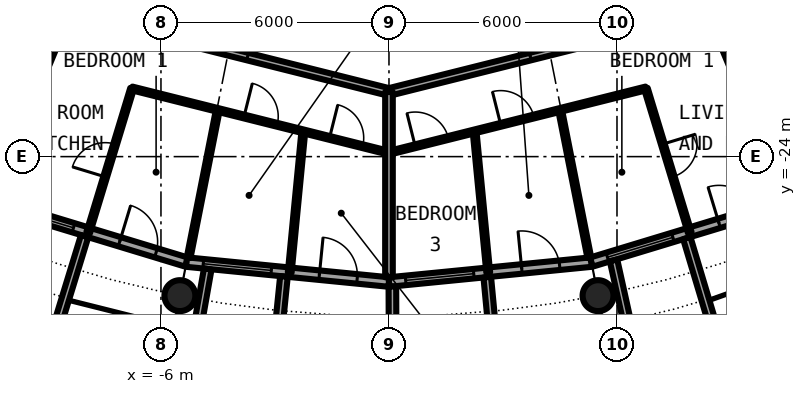
"""IFC4 building model, lengths in metres.
Left out: names, types, materials, properties, quantities, classifications, styles, units other than length and angle.
Written with IfcOpenShell. Run it as: python <this file> out.ifc"""

import sys

from ifc_helpers import new_model, si_unit, direction, frame, frame_2d, origin, origin_2d, place, context, subcontext, project, spatial, rectangle, circle, hollow_circle, extrude, element, fill, save


model = new_model("IFC4")
c1 = context("Model", 3, precision=1e-05, world=origin(), true_north=direction((0.0, 1.0)))
c2 = subcontext(c1, "Body", "Model", "MODEL_VIEW")
j1 = project(units=[si_unit("LENGTHUNIT", "METRE"), si_unit("PLANEANGLEUNIT", "RADIAN")], contexts=[c1])
p1 = place(None, origin())
s1 = spatial("IfcSite", under=j1, at=p1, CompositionType="ELEMENT")
p2 = place(p1, origin())
s2 = spatial("IfcBuilding", under=s1, at=p2, CompositionType="ELEMENT")
p3 = place(p2, frame((0.0, 0.0, 161.6)))
s3 = spatial("IfcBuildingStorey", under=s2, at=p3, CompositionType="ELEMENT", Elevation=161.6)
for number, where, z_axis, x_axis in (
    (1, (-5.501, -27.658, 0.0), (0.0, 0.0, 1.0), (1.0, 0.0, 0.0)),
    (2, (5.501, -27.658, 0.0), (0.0, 0.0, 1.0), (1.0, 0.0, 0.0)),
):
    element("IfcColumn", number, at=place(p3, frame(where, z_axis=z_axis, x_axis=x_axis)), inside=s3, PredefinedType="COLUMN", context=c2, shape_type="SweptSolid", body=[
        extrude(hollow_circle(Radius=0.406, WallThickness=0.04, at=origin_2d()), origin(), (0.0, 0.0, 1.0), 3.05),
    ])
p4 = place(p3, frame((-10.447, -25.222, 0.0), z_axis=(0.0, 0.0, 1.0), x_axis=(0.956965678721, -0.290201119486, 0.0)))
e3 = element("IfcWall", 3, at=p4, inside=s3, PredefinedType="SOLIDWALL", context=c2, shape_type="SweptSolid", body=[
    extrude(rectangle(XDim=5.351, YDim=0.25, at=frame_2d((2.676, 0.0))), origin(), (0.0, 0.0, 1.0), 2.7),
])
p5 = place(p4, frame((0.441, 0.0, 0.3)))
e4 = element("IfcOpeningElement", 4, at=p5, cuts=e3, PredefinedType="OPENING", context=c2, shape_type="SweptSolid", body=[
    extrude(rectangle(XDim=1.8, YDim=2.1, at=frame_2d((0.9, 1.05))), frame((0.0, 0.135, 0.0), z_axis=(0.0, -1.0, 0.0), x_axis=(1.0, 0.0, 0.0)), (0.0, 0.0, 1.0), 0.27),
])
p6 = place(p4, frame((3.51, 0.0, 0.0)))
e5 = element("IfcOpeningElement", 5, at=p6, cuts=e3, PredefinedType="OPENING", context=c2, shape_type="SweptSolid", body=[
    extrude(rectangle(XDim=1.0, YDim=2.2, at=frame_2d((0.5, 1.1))), frame((0.0, 0.135, 0.0), z_axis=(0.0, -1.0, 0.0), x_axis=(1.0, 0.0, 0.0)), (0.0, 0.0, 1.0), 0.27),
])
p7 = place(p3, frame((-11.638, -28.084, -0.03), z_axis=(0.0, 0.0, 1.0), x_axis=(0.941461077774, -0.337121697664, 0.0)))
e6 = element("IfcWall", 6, at=p7, inside=s3, PredefinedType="SOLIDWALL", context=c2, shape_type="SweptSolid", body=[
    extrude(rectangle(XDim=2.993, YDim=0.2, at=frame_2d((1.497, 0.0))), origin(), (0.0, 0.0, 1.0), 2.73),
])
p8 = place(p7, frame((0.457, 0.0, 0.33)))
e7 = element("IfcOpeningElement", 7, at=p8, cuts=e6, PredefinedType="OPENING", context=c2, shape_type="SweptSolid", body=[
    extrude(circle(Radius=1.04, at=frame_2d((1.04, 1.04))), frame((0.0, 0.11, 0.0), z_axis=(0.0, -1.0, 0.0), x_axis=(1.0, 0.0, 0.0)), (0.0, 0.0, 1.0), 0.22),
])
p9 = place(p3, frame((-8.009, -26.092, -0.03), z_axis=(0.0, 0.0, 1.0), x_axis=(-0.293406695073, -0.955987715029, 0.0)))
e8 = element("IfcWall", 8, at=p9, inside=s3, PredefinedType="SOLIDWALL", context=c2, shape_type="SweptSolid", body=[
    extrude(rectangle(XDim=3.006, YDim=0.2, at=frame_2d((1.503, 0.0))), origin(), (0.0, 0.0, 1.0), 2.73),
])
p10 = place(p3, frame((-5.326, -26.775, 0.0), z_axis=(0.0, 0.0, 1.0), x_axis=(0.995173996315, -0.098126026407, 0.0)))
e9 = element("IfcWall", 9, at=p10, inside=s3, PredefinedType="SOLIDWALL", context=c2, shape_type="SweptSolid", body=[
    extrude(rectangle(XDim=5.352, YDim=0.25, at=frame_2d((2.676, 0.0))), origin(), (0.0, 0.0, 1.0), 2.7),
])
p11 = place(p10, frame((0.441, 0.0, 0.3)))
e10 = element("IfcOpeningElement", 10, at=p11, cuts=e9, PredefinedType="OPENING", context=c2, shape_type="SweptSolid", body=[
    extrude(rectangle(XDim=1.8, YDim=2.1, at=frame_2d((0.9, 1.05))), frame((0.0, 0.135, 0.0), z_axis=(0.0, -1.0, 0.0), x_axis=(1.0, 0.0, 0.0)), (0.0, 0.0, 1.0), 0.27),
])
p12 = place(p10, frame((3.51, 0.0, 0.0)))
e11 = element("IfcOpeningElement", 11, at=p12, cuts=e9, PredefinedType="OPENING", context=c2, shape_type="SweptSolid", body=[
    extrude(rectangle(XDim=1.0, YDim=2.2, at=frame_2d((0.5, 1.1))), frame((0.0, 0.135, 0.0), z_axis=(0.0, -1.0, 0.0), x_axis=(1.0, 0.0, 0.0)), (0.0, 0.0, 1.0), 0.27),
])
p13 = place(p3, frame((-4.769, -26.956, -0.03), z_axis=(0.0, 0.0, 1.0), x_axis=(-0.174056778901, -0.984735618183, 0.0)))
e12 = element("IfcWall", 12, at=p13, inside=s3, PredefinedType="SOLIDWALL", context=c2, shape_type="SweptSolid", body=[
    extrude(rectangle(XDim=2.925, YDim=0.2, at=frame_2d((1.462, 0.0))), origin(), (0.0, 0.0, 1.0), 2.73),
])
p14 = place(p3, frame((-2.764, -27.153, -0.03), z_axis=(0.0, 0.0, 1.0), x_axis=(-0.101505487237, -0.994834979311, 0.0)))
e13 = element("IfcWall", 13, at=p14, inside=s3, PredefinedType="SOLIDWALL", context=c2, shape_type="SweptSolid", body=[
    extrude(rectangle(XDim=3.007, YDim=0.2, at=frame_2d((1.503, 0.0))), origin(), (0.0, 0.0, 1.0), 2.73),
])
p15 = place(p3, frame((0.0, -27.3, 0.0), z_axis=(0.0, 0.0, 1.0), x_axis=(0.995173996315, 0.098126026407, 0.0)))
e14 = element("IfcWall", 14, at=p15, inside=s3, PredefinedType="SOLIDWALL", context=c2, shape_type="SweptSolid", body=[
    extrude(rectangle(XDim=5.352, YDim=0.25, at=frame_2d((2.676, 0.0))), origin(), (0.0, 0.0, 1.0), 2.7),
])
p16 = place(p15, frame((0.441, 0.0, 0.3)))
e15 = element("IfcOpeningElement", 15, at=p16, cuts=e14, PredefinedType="OPENING", context=c2, shape_type="SweptSolid", body=[
    extrude(rectangle(XDim=1.8, YDim=2.1, at=frame_2d((0.9, 1.05))), frame((0.0, 0.135, 0.0), z_axis=(0.0, -1.0, 0.0), x_axis=(1.0, 0.0, 0.0)), (0.0, 0.0, 1.0), 0.27),
])
p17 = place(p15, frame((3.51, 0.0, 0.0)))
e16 = element("IfcOpeningElement", 16, at=p17, cuts=e14, PredefinedType="OPENING", context=c2, shape_type="SweptSolid", body=[
    extrude(rectangle(XDim=1.0, YDim=2.2, at=frame_2d((0.5, 1.1))), frame((0.0, 0.135, 0.0), z_axis=(0.0, -1.0, 0.0), x_axis=(1.0, 0.0, 0.0)), (0.0, 0.0, 1.0), 0.27),
])
p18 = place(p3, frame((0.09, -27.417, -0.03), z_axis=(0.0, 0.0, 1.0), x_axis=(0.00347308367, -0.999993968827, 0.0)))
e17 = element("IfcWall", 17, at=p18, inside=s3, PredefinedType="SOLIDWALL", context=c2, shape_type="SweptSolid", body=[
    extrude(rectangle(XDim=2.882, YDim=0.2, at=frame_2d((1.441, 0.0))), origin(), (0.0, 0.0, 1.0), 2.73),
])
p19 = place(p3, frame((2.586, -27.171, -0.03), z_axis=(0.0, 0.0, 1.0), x_axis=(0.094548432284, -0.995520262954, 0.0)))
e18 = element("IfcWall", 18, at=p19, inside=s3, PredefinedType="SOLIDWALL", context=c2, shape_type="SweptSolid", body=[
    extrude(rectangle(XDim=3.006, YDim=0.2, at=frame_2d((1.503, 0.0))), origin(), (0.0, 0.0, 1.0), 2.73),
])
p20 = place(p3, frame((5.326, -26.775, 0.0), z_axis=(0.0, 0.0, 1.0), x_axis=(0.956965678721, 0.290201119486, 0.0)))
e19 = element("IfcWall", 19, at=p20, inside=s3, PredefinedType="SOLIDWALL", context=c2, shape_type="SweptSolid", body=[
    extrude(rectangle(XDim=5.351, YDim=0.25, at=frame_2d((2.676, 0.0))), origin(), (0.0, 0.0, 1.0), 2.7),
])
p21 = place(p20, frame((0.441, 0.0, 0.3)))
e20 = element("IfcOpeningElement", 20, at=p21, cuts=e19, PredefinedType="OPENING", context=c2, shape_type="SweptSolid", body=[
    extrude(rectangle(XDim=1.8, YDim=2.1, at=frame_2d((0.9, 1.05))), frame((0.0, 0.135, 0.0), z_axis=(0.0, -1.0, 0.0), x_axis=(1.0, 0.0, 0.0)), (0.0, 0.0, 1.0), 0.27),
])
p22 = place(p20, frame((3.51, 0.0, 0.0)))
e21 = element("IfcOpeningElement", 21, at=p22, cuts=e19, PredefinedType="OPENING", context=c2, shape_type="SweptSolid", body=[
    extrude(rectangle(XDim=1.0, YDim=2.2, at=frame_2d((0.5, 1.1))), frame((0.0, 0.135, 0.0), z_axis=(0.0, -1.0, 0.0), x_axis=(1.0, 0.0, 0.0)), (0.0, 0.0, 1.0), 0.27),
])
p23 = place(p3, frame((5.909, -26.729, -0.03), z_axis=(0.0, 0.0, 1.0), x_axis=(0.216409053917, -0.976302781612, 0.0)))
e22 = element("IfcWall", 22, at=p23, inside=s3, PredefinedType="SOLIDWALL", context=c2, shape_type="SweptSolid", body=[
    extrude(rectangle(XDim=2.925, YDim=0.2, at=frame_2d((1.463, 0.0))), origin(), (0.0, 0.0, 1.0), 2.73),
])
p24 = place(p3, frame((7.837, -26.144, -0.03), z_axis=(0.0, 0.0, 1.0), x_axis=(0.287064767992, -0.957911174889, 0.0)))
e23 = element("IfcWall", 23, at=p24, inside=s3, PredefinedType="SOLIDWALL", context=c2, shape_type="SweptSolid", body=[
    extrude(rectangle(XDim=3.006, YDim=0.2, at=frame_2d((1.503, 0.0))), origin(), (0.0, 0.0, 1.0), 2.73),
])
p25 = place(p3, frame((-6.762, -22.206, 0.0), z_axis=(0.0, 0.0, 1.0), x_axis=(0.97002908491, -0.242988836015, 0.0)))
e24 = element("IfcWall", 24, at=p25, inside=s3, PredefinedType="PARTITIONING", context=c2, shape_type="SweptSolid", body=[
    extrude(rectangle(XDim=6.971, YDim=0.1, at=frame_2d((3.485, 0.0))), origin(), (0.0, 0.0, 1.0), 2.7),
])
p26 = place(p25, frame((3.039, 0.0, 0.0)))
e25 = element("IfcOpeningElement", 25, at=p26, cuts=e24, PredefinedType="OPENING", context=c2, shape_type="SweptSolid", body=[
    extrude(rectangle(XDim=0.9, YDim=2.3, at=frame_2d((0.45, 1.15))), frame((0.0, 0.06, 0.0), z_axis=(0.0, -1.0, 0.0), x_axis=(1.0, 0.0, 0.0)), (0.0, 0.0, 1.0), 0.12),
])
p27 = place(p25, frame((5.358, 0.0, 0.0)))
e26 = element("IfcOpeningElement", 26, at=p27, cuts=e24, PredefinedType="OPENING", context=c2, shape_type="SweptSolid", body=[
    extrude(rectangle(XDim=0.9, YDim=2.3, at=frame_2d((0.45, 1.15))), frame((0.0, 0.06, 0.0), z_axis=(0.0, -1.0, 0.0), x_axis=(1.0, 0.0, 0.0)), (0.0, 0.0, 1.0), 0.12),
])
p28 = place(p3, frame((0.0, -23.9, 0.0), z_axis=(0.0, 0.0, 1.0), x_axis=(0.97002908491, 0.242988836015, 0.0)))
e27 = element("IfcWall", 27, at=p28, inside=s3, PredefinedType="PARTITIONING", context=c2, shape_type="SweptSolid", body=[
    extrude(rectangle(XDim=6.971, YDim=0.1, at=frame_2d((3.485, 0.0))), origin(), (0.0, 0.0, 1.0), 2.7),
])
p29 = place(p28, frame((3.032, 0.0, 0.0)))
e28 = element("IfcOpeningElement", 28, at=p29, cuts=e27, PredefinedType="OPENING", context=c2, shape_type="SweptSolid", body=[
    extrude(rectangle(XDim=0.9, YDim=2.3, at=frame_2d((0.45, 1.15))), frame((0.0, 0.06, 0.0), z_axis=(0.0, -1.0, 0.0), x_axis=(1.0, 0.0, 0.0)), (0.0, 0.0, 1.0), 0.12),
])
p30 = place(p28, frame((0.712, 0.0, 0.0)))
e29 = element("IfcOpeningElement", 29, at=p30, cuts=e27, PredefinedType="OPENING", context=c2, shape_type="SweptSolid", body=[
    extrude(rectangle(XDim=0.9, YDim=2.3, at=frame_2d((0.45, 1.15))), frame((0.0, 0.06, 0.0), z_axis=(0.0, -1.0, 0.0), x_axis=(1.0, 0.0, 0.0)), (0.0, 0.0, 1.0), 0.12),
])
p31 = place(p3, frame((-10.518, -19.665, 0.0), z_axis=(0.0, 0.0, 1.0), x_axis=(0.970023181991, -0.243012399685, 0.0)))
e30 = element("IfcWall", 30, at=p31, inside=s3, PredefinedType="PARTITIONING", context=c2, shape_type="SweptSolid", body=[
    extrude(rectangle(XDim=10.843, YDim=0.2, at=frame_2d((5.421, 0.0))), origin(), (0.0, 0.0, 1.0), 2.7),
])
p32 = place(p31, frame((6.008, 0.0, 0.0)))
e31 = element("IfcOpeningElement", 31, at=p32, cuts=e30, PredefinedType="OPENING", context=c2, shape_type="SweptSolid", body=[
    extrude(rectangle(XDim=1.0, YDim=2.3, at=frame_2d((0.5, 1.15))), frame((0.0, 0.11, 0.0), z_axis=(0.0, -1.0, 0.0), x_axis=(1.0, 0.0, 0.0)), (0.0, 0.0, 1.0), 0.22),
])
p33 = place(p3, frame((0.0, -22.3, 0.0), z_axis=(0.0, 0.0, 1.0), x_axis=(0.970023181991, 0.243012399685, 0.0)))
e32 = element("IfcWall", 32, at=p33, inside=s3, PredefinedType="PARTITIONING", context=c2, shape_type="SweptSolid", body=[
    extrude(rectangle(XDim=10.843, YDim=0.2, at=frame_2d((5.421, 0.0))), origin(), (0.0, 0.0, 1.0), 2.7),
])
p34 = place(p33, frame((3.835, 0.0, 0.0)))
e33 = element("IfcOpeningElement", 33, at=p34, cuts=e32, PredefinedType="OPENING", context=c2, shape_type="SweptSolid", body=[
    extrude(rectangle(XDim=1.0, YDim=2.3, at=frame_2d((0.5, 1.15))), frame((0.0, 0.11, 0.0), z_axis=(0.0, -1.0, 0.0), x_axis=(1.0, 0.0, 0.0)), (0.0, 0.0, 1.0), 0.22),
])
p35 = place(p3, frame((-9.01, -21.643, 0.0), z_axis=(0.0, 0.0, 1.0), x_axis=(0.384228756538, 0.923237923099, 0.0)))
e34 = element("IfcWall", 34, at=p35, inside=s3, PredefinedType="PARTITIONING", context=c2, shape_type="SweptSolid", body=[
    extrude(rectangle(XDim=1.569, YDim=0.1, at=frame_2d((0.785, 0.0))), origin(), (0.0, 0.0, 1.0), 2.7),
])
p36 = place(p3, frame((-7.914, -25.997, 0.0), z_axis=(0.0, 0.0, 1.0), x_axis=(0.291291575636, 0.956634317785, 0.0)))
e35 = element("IfcWall", 35, at=p36, inside=s3, PredefinedType="PARTITIONING", context=c2, shape_type="SweptSolid", body=[
    extrude(rectangle(XDim=3.962, YDim=0.1, at=frame_2d((1.981, 0.0))), origin(), (0.0, 0.0, 1.0), 2.7),
])
p37 = place(p36, frame((1.531, 0.0, 0.0)))
e36 = element("IfcOpeningElement", 36, at=p37, cuts=e35, PredefinedType="OPENING", context=c2, shape_type="SweptSolid", body=[
    extrude(rectangle(XDim=0.9, YDim=2.3, at=frame_2d((0.45, 1.15))), frame((0.0, 0.06, 0.0), z_axis=(0.0, -1.0, 0.0), x_axis=(1.0, 0.0, 0.0)), (0.0, 0.0, 1.0), 0.12),
])
p38 = place(p3, frame((-5.272, -26.659, 0.0), z_axis=(0.0, 0.0, 1.0), x_axis=(0.194089507313, 0.980983824103, 0.0)))
e37 = element("IfcWall", 37, at=p38, inside=s3, PredefinedType="PARTITIONING", context=c2, shape_type="SweptSolid", body=[
    extrude(rectangle(XDim=3.962, YDim=0.1, at=frame_2d((1.981, 0.0))), origin(), (0.0, 0.0, 1.0), 2.7),
])
p39 = place(p3, frame((-2.612, -27.049, 0.0), z_axis=(0.0, 0.0, 1.0), x_axis=(0.09626981452, 0.995355274669, 0.0)))
e38 = element("IfcWall", 38, at=p39, inside=s3, PredefinedType="PARTITIONING", context=c2, shape_type="SweptSolid", body=[
    extrude(rectangle(XDim=3.73, YDim=0.1, at=frame_2d((1.865, 0.0))), origin(), (0.0, 0.0, 1.0), 2.7),
])
p40 = place(p3, frame((0.0, -27.175, 0.0), z_axis=(0.0, 0.0, 1.0), x_axis=(0.0, 1.0, 0.0)))
e39 = element("IfcWall", 39, at=p40, inside=s3, PredefinedType="PARTITIONING", context=c2, shape_type="SweptSolid", body=[
    extrude(rectangle(XDim=4.875, YDim=0.2, at=frame_2d((2.438, 0.0))), origin(), (0.0, 0.0, 1.0), 2.7),
])
p41 = place(p3, frame((2.253, -23.336, 0.0), z_axis=(0.0, 0.0, 1.0), x_axis=(0.09626981452, -0.995355274669, 0.0)))
e40 = element("IfcWall", 40, at=p41, inside=s3, PredefinedType="PARTITIONING", context=c2, shape_type="SweptSolid", body=[
    extrude(rectangle(XDim=3.73, YDim=0.1, at=frame_2d((1.865, 0.0))), origin(), (0.0, 0.0, 1.0), 2.7),
])
p42 = place(p3, frame((4.503, -22.772, 0.0), z_axis=(0.0, 0.0, 1.0), x_axis=(0.194089507313, -0.980983824103, 0.0)))
e41 = element("IfcWall", 41, at=p42, inside=s3, PredefinedType="PARTITIONING", context=c2, shape_type="SweptSolid", body=[
    extrude(rectangle(XDim=3.962, YDim=0.1, at=frame_2d((1.981, 0.0))), origin(), (0.0, 0.0, 1.0), 2.7),
])
p43 = place(p3, frame((6.76, -22.207, 0.0), z_axis=(0.0, 0.0, 1.0), x_axis=(0.291291575636, -0.956634317785, 0.0)))
e42 = element("IfcWall", 42, at=p43, inside=s3, PredefinedType="PARTITIONING", context=c2, shape_type="SweptSolid", body=[
    extrude(rectangle(XDim=3.962, YDim=0.1, at=frame_2d((1.981, 0.0))), origin(), (0.0, 0.0, 1.0), 2.7),
])
p44 = place(p43, frame((1.531, 0.0, 0.0)))
e43 = element("IfcOpeningElement", 43, at=p44, cuts=e42, PredefinedType="OPENING", context=c2, shape_type="SweptSolid", body=[
    extrude(rectangle(XDim=0.9, YDim=2.3, at=frame_2d((0.45, 1.15))), frame((0.0, 0.06, 0.0), z_axis=(0.0, -1.0, 0.0), x_axis=(1.0, 0.0, 0.0)), (0.0, 0.0, 1.0), 0.12),
])
p45 = place(p3, frame((8.41, -20.193, 0.0), z_axis=(0.0, 0.0, 1.0), x_axis=(0.384228756538, -0.923237923099, 0.0)))
e44 = element("IfcWall", 44, at=p45, inside=s3, PredefinedType="PARTITIONING", context=c2, shape_type="SweptSolid", body=[
    extrude(rectangle(XDim=1.569, YDim=0.1, at=frame_2d((0.785, 0.0))), origin(), (0.0, 0.0, 1.0), 2.7),
])
p46 = place(p5, origin())
e45 = element("IfcWindow", 45, at=p46, inside=s3, PartitioningType="SINGLE_PANEL", PredefinedType="WINDOW", context=c2, shape_type="SweptSolid", body=[
    extrude(rectangle(XDim=1.8, YDim=2.1, at=frame_2d((0.9, 1.05))), frame((0.0, 0.03, 0.0), z_axis=(0.0, -1.0, 0.0), x_axis=(1.0, 0.0, 0.0)), (0.0, 0.0, 1.0), 0.06),
])
fill(e4, e45)
p47 = place(p6, origin())
e46 = element("IfcDoor", 46, at=p47, inside=s3, OperationType="SINGLE_SWING_LEFT", PredefinedType="DOOR", context=c2, shape_type="SweptSolid", body=[
    extrude(rectangle(XDim=1.0, YDim=2.2, at=frame_2d((0.5, 1.1))), frame((0.0, 0.025, 0.0), z_axis=(0.0, -1.0, 0.0), x_axis=(1.0, 0.0, 0.0)), (0.0, 0.0, 1.0), 0.05),
])
fill(e5, e46)
p48 = place(p11, origin())
e47 = element("IfcWindow", 47, at=p48, inside=s3, PartitioningType="SINGLE_PANEL", PredefinedType="WINDOW", context=c2, shape_type="SweptSolid", body=[
    extrude(rectangle(XDim=1.8, YDim=2.1, at=frame_2d((0.9, 1.05))), frame((0.0, 0.03, 0.0), z_axis=(0.0, -1.0, 0.0), x_axis=(1.0, 0.0, 0.0)), (0.0, 0.0, 1.0), 0.06),
])
fill(e10, e47)
p49 = place(p12, origin())
e48 = element("IfcDoor", 48, at=p49, inside=s3, OperationType="SINGLE_SWING_LEFT", PredefinedType="DOOR", context=c2, shape_type="SweptSolid", body=[
    extrude(rectangle(XDim=1.0, YDim=2.2, at=frame_2d((0.5, 1.1))), frame((0.0, 0.025, 0.0), z_axis=(0.0, -1.0, 0.0), x_axis=(1.0, 0.0, 0.0)), (0.0, 0.0, 1.0), 0.05),
])
fill(e11, e48)
p50 = place(p16, origin())
e49 = element("IfcWindow", 49, at=p50, inside=s3, PartitioningType="SINGLE_PANEL", PredefinedType="WINDOW", context=c2, shape_type="SweptSolid", body=[
    extrude(rectangle(XDim=1.8, YDim=2.1, at=frame_2d((0.9, 1.05))), frame((0.0, 0.03, 0.0), z_axis=(0.0, -1.0, 0.0), x_axis=(1.0, 0.0, 0.0)), (0.0, 0.0, 1.0), 0.06),
])
fill(e15, e49)
p51 = place(p17, origin())
e50 = element("IfcDoor", 50, at=p51, inside=s3, OperationType="SINGLE_SWING_LEFT", PredefinedType="DOOR", context=c2, shape_type="SweptSolid", body=[
    extrude(rectangle(XDim=1.0, YDim=2.2, at=frame_2d((0.5, 1.1))), frame((0.0, 0.025, 0.0), z_axis=(0.0, -1.0, 0.0), x_axis=(1.0, 0.0, 0.0)), (0.0, 0.0, 1.0), 0.05),
])
fill(e16, e50)
p52 = place(p21, origin())
e51 = element("IfcWindow", 51, at=p52, inside=s3, PartitioningType="SINGLE_PANEL", PredefinedType="WINDOW", context=c2, shape_type="SweptSolid", body=[
    extrude(rectangle(XDim=1.8, YDim=2.1, at=frame_2d((0.9, 1.05))), frame((0.0, 0.03, 0.0), z_axis=(0.0, -1.0, 0.0), x_axis=(1.0, 0.0, 0.0)), (0.0, 0.0, 1.0), 0.06),
])
fill(e20, e51)
p53 = place(p22, origin())
e52 = element("IfcDoor", 52, at=p53, inside=s3, OperationType="SINGLE_SWING_LEFT", PredefinedType="DOOR", context=c2, shape_type="SweptSolid", body=[
    extrude(rectangle(XDim=1.0, YDim=2.2, at=frame_2d((0.5, 1.1))), frame((0.0, 0.025, 0.0), z_axis=(0.0, -1.0, 0.0), x_axis=(1.0, 0.0, 0.0)), (0.0, 0.0, 1.0), 0.05),
])
fill(e21, e52)
p54 = place(p32, origin())
e53 = element("IfcDoor", 53, at=p54, inside=s3, OperationType="SINGLE_SWING_RIGHT", PredefinedType="DOOR", context=c2, shape_type="SweptSolid", body=[
    extrude(rectangle(XDim=1.0, YDim=2.3, at=frame_2d((0.5, 1.15))), frame((0.0, 0.025, 0.0), z_axis=(0.0, -1.0, 0.0), x_axis=(1.0, 0.0, 0.0)), (0.0, 0.0, 1.0), 0.05),
])
fill(e31, e53)
p55 = place(p37, origin())
e54 = element("IfcDoor", 54, at=p55, inside=s3, OperationType="SINGLE_SWING_RIGHT", PredefinedType="DOOR", context=c2, shape_type="SweptSolid", body=[
    extrude(rectangle(XDim=0.9, YDim=2.3, at=frame_2d((0.45, 1.15))), frame((0.0, 0.025, 0.0), z_axis=(0.0, -1.0, 0.0), x_axis=(1.0, 0.0, 0.0)), (0.0, 0.0, 1.0), 0.05),
])
fill(e36, e54)
p56 = place(p26, origin())
e55 = element("IfcDoor", 55, at=p56, inside=s3, OperationType="SINGLE_SWING_RIGHT", PredefinedType="DOOR", context=c2, shape_type="SweptSolid", body=[
    extrude(rectangle(XDim=0.9, YDim=2.3, at=frame_2d((0.45, 1.15))), frame((0.0, 0.025, 0.0), z_axis=(0.0, -1.0, 0.0), x_axis=(1.0, 0.0, 0.0)), (0.0, 0.0, 1.0), 0.05),
])
fill(e25, e55)
p57 = place(p27, origin())
e56 = element("IfcDoor", 56, at=p57, inside=s3, OperationType="SINGLE_SWING_RIGHT", PredefinedType="DOOR", context=c2, shape_type="SweptSolid", body=[
    extrude(rectangle(XDim=0.9, YDim=2.3, at=frame_2d((0.45, 1.15))), frame((0.0, 0.025, 0.0), z_axis=(0.0, -1.0, 0.0), x_axis=(1.0, 0.0, 0.0)), (0.0, 0.0, 1.0), 0.05),
])
fill(e26, e56)
p58 = place(p34, origin())
e57 = element("IfcDoor", 57, at=p58, inside=s3, OperationType="SINGLE_SWING_LEFT", PredefinedType="DOOR", context=c2, shape_type="SweptSolid", body=[
    extrude(rectangle(XDim=1.0, YDim=2.3, at=frame_2d((0.5, 1.15))), frame((0.0, 0.025, 0.0), z_axis=(0.0, -1.0, 0.0), x_axis=(1.0, 0.0, 0.0)), (0.0, 0.0, 1.0), 0.05),
])
fill(e33, e57)
p59 = place(p44, origin())
e58 = element("IfcDoor", 58, at=p59, inside=s3, OperationType="SINGLE_SWING_RIGHT", PredefinedType="DOOR", context=c2, shape_type="SweptSolid", body=[
    extrude(rectangle(XDim=0.9, YDim=2.3, at=frame_2d((0.45, 1.15))), frame((0.0, 0.025, 0.0), z_axis=(0.0, -1.0, 0.0), x_axis=(1.0, 0.0, 0.0)), (0.0, 0.0, 1.0), 0.05),
])
fill(e43, e58)
p60 = place(p29, origin())
e59 = element("IfcDoor", 59, at=p60, inside=s3, OperationType="SINGLE_SWING_LEFT", PredefinedType="DOOR", context=c2, shape_type="SweptSolid", body=[
    extrude(rectangle(XDim=0.9, YDim=2.3, at=frame_2d((0.45, 1.15))), frame((0.0, 0.025, 0.0), z_axis=(0.0, -1.0, 0.0), x_axis=(1.0, 0.0, 0.0)), (0.0, 0.0, 1.0), 0.05),
])
fill(e28, e59)
p61 = place(p30, origin())
e60 = element("IfcDoor", 60, at=p61, inside=s3, OperationType="SINGLE_SWING_LEFT", PredefinedType="DOOR", context=c2, shape_type="SweptSolid", body=[
    extrude(rectangle(XDim=0.9, YDim=2.3, at=frame_2d((0.45, 1.15))), frame((0.0, 0.025, 0.0), z_axis=(0.0, -1.0, 0.0), x_axis=(1.0, 0.0, 0.0)), (0.0, 0.0, 1.0), 0.05),
])
fill(e29, e60)
save(model, sys.argv[1])
